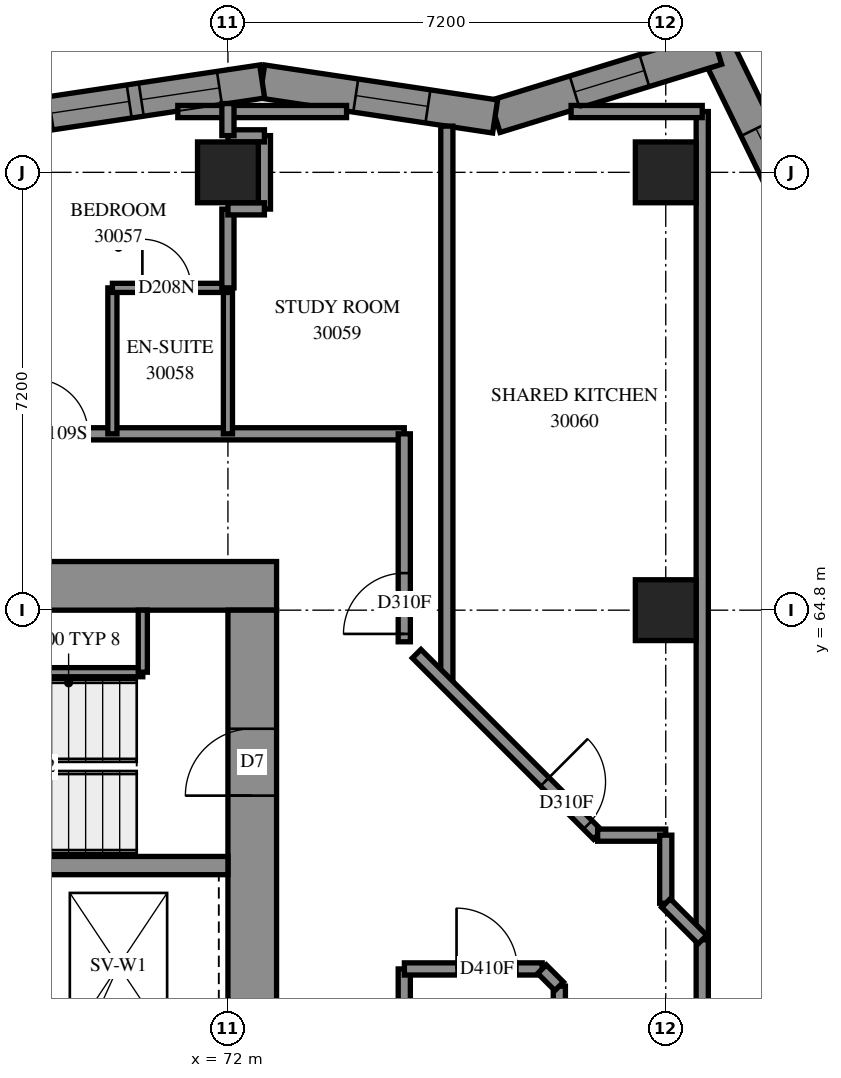
"""IFC4 building model, lengths in metres.
Left out: names, types, materials, properties, quantities, classifications, styles, units other than length and angle.
Written with IfcOpenShell. Run it as: python <this file> out.ifc"""

import sys

from ifc_helpers import new_model, si_unit, direction, frame, frame_2d, origin, origin_2d, place, context, subcontext, project, spatial, polyline, rectangle, outline, extrude, element, fill, save


model = new_model("IFC4")
c1 = context("Model", 3, precision=1e-05, world=origin(), true_north=direction((0.0, 1.0)))
c2 = subcontext(c1, "Body", "Model", "MODEL_VIEW")
j1 = project(units=[si_unit("LENGTHUNIT", "METRE"), si_unit("PLANEANGLEUNIT", "RADIAN")], contexts=[c1])
p1 = place(None, origin())
s1 = spatial("IfcSite", under=j1, at=p1, CompositionType="ELEMENT")
p2 = place(p1, origin())
s2 = spatial("IfcBuilding", under=s1, at=p2, CompositionType="ELEMENT")
p3 = place(p2, frame((0.0, 0.0, 111.8)))
s3 = spatial("IfcBuildingStorey", under=s2, at=p3, CompositionType="ELEMENT", Elevation=111.8)
for number, where, z_axis, x_axis in (
    (1, (72.0, 72.0, 0.0), (0.0, 0.0, 1.0), (1.0, 0.0, 0.0)),
    (2, (79.2, 64.8, 0.0), (0.0, 0.0, 1.0), (1.0, 0.0, 0.0)),
    (3, (79.2, 72.0, 0.0), (0.0, 0.0, 1.0), (1.0, 0.0, 0.0)),
):
    element("IfcColumn", number, at=place(p3, frame(where, z_axis=z_axis, x_axis=x_axis)), inside=s3, PredefinedType="COLUMN", context=c2, shape_type="SweptSolid", body=[
        extrude(rectangle(XDim=1.0, YDim=1.0, at=origin_2d()), origin(), (0.0, 0.0, 1.0), 3.1),
    ])
p4 = place(p3, frame((56.8, 65.2, -0.3), z_axis=(0.0, 0.0, 1.0), x_axis=(1.0, 0.0, 0.0)))
e4 = element("IfcWall", 4, at=p4, inside=s3, PredefinedType="SHEAR", context=c2, shape_type="SweptSolid", body=[
    extrude(rectangle(XDim=16.0, YDim=0.8, at=frame_2d((8.0, 0.0))), origin(), (0.0, 0.0, 1.0), 2.7),
])
p5 = place(p4, frame((10.8, 0.0, 0.3)))
e5 = element("IfcOpeningElement", 5, at=p5, cuts=e4, PredefinedType="OPENING", context=c2, shape_type="SweptSolid", body=[
    extrude(rectangle(XDim=0.8, YDim=2.1, at=frame_2d((0.4, 1.05))), frame((0.0, 0.41, 0.0), z_axis=(0.0, -1.0, 0.0), x_axis=(1.0, 0.0, 0.0)), (0.0, 0.0, 1.0), 0.82),
])
p6 = place(p3, frame((72.4, 50.4, -0.3), z_axis=(0.0, 0.0, 1.0), x_axis=(0.0, 1.0, 0.0)))
e6 = element("IfcWall", 6, at=p6, inside=s3, PredefinedType="SHEAR", context=c2, shape_type="SweptSolid", body=[
    extrude(rectangle(XDim=14.4, YDim=0.8, at=frame_2d((7.2, 0.0))), origin(), (0.0, 0.0, 1.0), 2.7),
])
p7 = place(p6, frame((4.55, 0.0, 0.3)))
e7 = element("IfcOpeningElement", 7, at=p7, cuts=e6, PredefinedType="OPENING", context=c2, shape_type="SweptSolid", body=[
    extrude(rectangle(XDim=1.1, YDim=2.1, at=frame_2d((0.55, 1.05))), frame((0.0, 0.41, 0.0), z_axis=(0.0, -1.0, 0.0), x_axis=(1.0, 0.0, 0.0)), (0.0, 0.0, 1.0), 0.82),
])
p8 = place(p6, frame((11.35, 0.0, 0.3)))
e8 = element("IfcOpeningElement", 8, at=p8, cuts=e6, PredefinedType="OPENING", context=c2, shape_type="SweptSolid", body=[
    extrude(rectangle(XDim=1.1, YDim=2.1, at=frame_2d((0.55, 1.05))), frame((0.0, 0.41, 0.0), z_axis=(0.0, -1.0, 0.0), x_axis=(1.0, 0.0, 0.0)), (0.0, 0.0, 1.0), 0.82),
])
p9 = place(p3, frame((64.8, 60.6, 0.0), z_axis=(0.0, 0.0, 1.0), x_axis=(1.0, 0.0, 0.0)))
e9 = element("IfcWall", 9, at=p9, inside=s3, PredefinedType="SOLIDWALL", context=c2, shape_type="SweptSolid", body=[
    extrude(rectangle(XDim=7.2, YDim=0.3, at=frame_2d((3.6, 0.0))), origin(), (0.0, 0.0, 1.0), 3.1),
])
p10 = place(p3, frame((76.372, 49.373, -0.3), z_axis=(0.0, 0.0, 1.0), x_axis=(0.7071067812, 0.7071067812, 0.0)))
e10 = element("IfcWall", 10, at=p10, inside=s3, PredefinedType="SHEAR", context=c2, shape_type="SweptSolid", body=[
    extrude(rectangle(XDim=14.4, YDim=0.8, at=frame_2d((7.2, 0.0))), origin(), (0.0, 0.0, 1.0), 2.7),
])
p11 = place(p10, frame((4.55, 0.0, 0.3)))
e11 = element("IfcOpeningElement", 11, at=p11, cuts=e10, PredefinedType="OPENING", context=c2, shape_type="SweptSolid", body=[
    extrude(rectangle(XDim=1.1, YDim=2.1, at=frame_2d((0.55, 1.05))), frame((0.0, 0.41, 0.0), z_axis=(0.0, -1.0, 0.0), x_axis=(1.0, 0.0, 0.0)), (0.0, 0.0, 1.0), 0.82),
])
p12 = place(p10, frame((11.35, 0.0, 0.3)))
e12 = element("IfcOpeningElement", 12, at=p12, cuts=e10, PredefinedType="OPENING", context=c2, shape_type="SweptSolid", body=[
    extrude(rectangle(XDim=1.1, YDim=2.1, at=frame_2d((0.55, 1.05))), frame((0.0, 0.41, 0.0), z_axis=(0.0, -1.0, 0.0), x_axis=(1.0, 0.0, 0.0)), (0.0, 0.0, 1.0), 0.82),
])
p13 = place(p3, frame((81.551, 70.947, 0.0), z_axis=(0.0, 0.0, 1.0), x_axis=(-0.4391450206, 0.8984161902, 0.0)))
e13 = element("IfcWall", 13, at=p13, inside=s3, PredefinedType="SOLIDWALL", context=c2, shape_type="SweptSolid", body=[
    extrude(outline(polyline([(0.07, -0.275), (3.678, -0.275), (3.208, 0.275), (-0.07, 0.275), (0.07, -0.275)])), origin(), (0.0, 0.0, 1.0), 3.1),
])
p14 = place(p13, frame((0.773, 0.0, 0.5)))
e14 = element("IfcOpeningElement", 14, at=p14, cuts=e13, PredefinedType="OPENING", context=c2, shape_type="SweptSolid", body=[
    extrude(rectangle(XDim=1.2, YDim=2.45, at=frame_2d((0.6, 1.225))), frame((0.0, 0.285, 0.0), z_axis=(0.0, -1.0, 0.0), x_axis=(1.0, 0.0, 0.0)), (0.0, 0.0, 1.0), 0.57),
])
p15 = place(p3, frame((80.039, 74.04, 0.0), z_axis=(0.0, 0.0, 1.0), x_axis=(-0.9557971513, -0.294026879, 0.0)))
e15 = element("IfcWall", 15, at=p15, inside=s3, PredefinedType="SOLIDWALL", context=c2, shape_type="SweptSolid", body=[
    extrude(outline(polyline([(-0.235, -0.275), (3.751, -0.275), (3.876, 0.275), (0.235, 0.275), (-0.235, -0.275)])), origin(), (0.0, 0.0, 1.0), 3.1),
])
p16 = place(p15, frame((1.245, 0.0, 0.5)))
e16 = element("IfcOpeningElement", 16, at=p16, cuts=e15, PredefinedType="OPENING", context=c2, shape_type="SweptSolid", body=[
    extrude(rectangle(XDim=1.2, YDim=2.45, at=frame_2d((0.6, 1.225))), frame((0.0, 0.285, 0.0), z_axis=(0.0, -1.0, 0.0), x_axis=(1.0, 0.0, 0.0)), (0.0, 0.0, 1.0), 0.57),
])
p17 = place(p3, frame((76.394, 72.919, 0.0), z_axis=(0.0, 0.0, 1.0), x_axis=(-0.9889181677, 0.1484616368, 0.0)))
e17 = element("IfcWall", 17, at=p17, inside=s3, PredefinedType="SOLIDWALL", context=c2, shape_type="SweptSolid", body=[
    extrude(outline(polyline([(0.063, -0.275), (3.915, -0.275), (3.832, 0.275), (-0.063, 0.275), (0.063, -0.275)])), origin(), (0.0, 0.0, 1.0), 3.1),
])
p18 = place(p17, frame((1.118, 0.0, 0.5)))
e18 = element("IfcOpeningElement", 18, at=p18, cuts=e17, PredefinedType="OPENING", context=c2, shape_type="SweptSolid", body=[
    extrude(rectangle(XDim=1.2, YDim=2.45, at=frame_2d((0.6, 1.225))), frame((0.0, 0.285, 0.0), z_axis=(0.0, -1.0, 0.0), x_axis=(1.0, 0.0, 0.0)), (0.0, 0.0, 1.0), 0.57),
])
p19 = place(p3, frame((72.563, 73.494, 0.0), z_axis=(0.0, 0.0, 1.0), x_axis=(-0.9889150173, -0.1484826202, 0.0)))
e19 = element("IfcWall", 19, at=p19, inside=s3, PredefinedType="SOLIDWALL", context=c2, shape_type="SweptSolid", body=[
    extrude(outline(polyline([(-0.041, -0.275), (3.811, -0.275), (3.894, 0.275), (0.041, 0.275), (-0.041, -0.275)])), origin(), (0.0, 0.0, 1.0), 3.1),
])
p20 = place(p19, frame((0.711, 0.0, 0.5)))
e20 = element("IfcOpeningElement", 20, at=p20, cuts=e19, PredefinedType="OPENING", context=c2, shape_type="SweptSolid", body=[
    extrude(rectangle(XDim=1.3, YDim=2.45, at=frame_2d((0.65, 1.225))), frame((0.0, 0.285, 0.0), z_axis=(0.0, -1.0, 0.0), x_axis=(1.0, 0.0, 0.0)), (0.0, 0.0, 1.0), 0.57),
])
p21 = place(p19, frame((2.211, 0.0, 0.5)))
e21 = element("IfcOpeningElement", 21, at=p21, cuts=e19, PredefinedType="OPENING", context=c2, shape_type="SweptSolid", body=[
    extrude(rectangle(XDim=1.3, YDim=2.45, at=frame_2d((0.65, 1.225))), frame((0.0, 0.285, 0.0), z_axis=(0.0, -1.0, 0.0), x_axis=(1.0, 0.0, 0.0)), (0.0, 0.0, 1.0), 0.57),
])
p22 = place(p3, frame((64.95, 63.78, 0.0), z_axis=(0.0, 0.0, 1.0), x_axis=(1.0, 0.0, 0.0)))
e22 = element("IfcWall", 22, at=p22, inside=s3, PredefinedType="PARTITIONING", context=c2, shape_type="SweptSolid", body=[
    extrude(rectangle(XDim=5.65, YDim=0.15, at=frame_2d((2.825, 0.0))), origin(), (0.0, 0.0, 1.0), 3.1),
])
p23 = place(p3, frame((70.6, 63.78, 0.0), z_axis=(0.0, 0.0, 1.0), x_axis=(0.0, 1.0, 0.0)))
e23 = element("IfcWall", 23, at=p23, inside=s3, PredefinedType="PARTITIONING", context=c2, shape_type="SweptSolid", body=[
    extrude(rectangle(XDim=1.02, YDim=0.15, at=frame_2d((0.51, 0.0))), origin(), (0.0, 0.0, 1.0), 3.1),
])
p24 = place(p3, frame((54.7, 67.7, 0.0), z_axis=(0.0, 0.0, 1.0), x_axis=(1.0, 0.0, 0.0)))
e24 = element("IfcWall", 24, at=p24, inside=s3, PredefinedType="PARTITIONING", context=c2, shape_type="SweptSolid", body=[
    extrude(rectangle(XDim=20.2, YDim=0.2, at=frame_2d((10.1, 0.0))), origin(), (0.0, 0.0, 1.0), 3.1),
])
p25 = place(p24, frame((5.2, 0.0, 0.0)))
e25 = element("IfcOpeningElement", 25, at=p25, cuts=e24, PredefinedType="OPENING", context=c2, shape_type="SweptSolid", body=[
    extrude(rectangle(XDim=0.9, YDim=2.1, at=frame_2d((0.45, 1.05))), frame((0.0, 0.11, 0.0), z_axis=(0.0, -1.0, 0.0), x_axis=(1.0, 0.0, 0.0)), (0.0, 0.0, 1.0), 0.22),
])
p26 = place(p24, frame((8.838, 0.0, 0.0)))
e26 = element("IfcOpeningElement", 26, at=p26, cuts=e24, PredefinedType="OPENING", context=c2, shape_type="SweptSolid", body=[
    extrude(rectangle(XDim=1.0, YDim=2.1, at=frame_2d((0.5, 1.05))), frame((0.0, 0.11, 0.0), z_axis=(0.0, -1.0, 0.0), x_axis=(1.0, 0.0, 0.0)), (0.0, 0.0, 1.0), 0.22),
])
p27 = place(p24, frame((14.1, 0.0, 0.0)))
e27 = element("IfcOpeningElement", 27, at=p27, cuts=e24, PredefinedType="OPENING", context=c2, shape_type="SweptSolid", body=[
    extrude(rectangle(XDim=0.9, YDim=2.1, at=frame_2d((0.45, 1.05))), frame((0.0, 0.11, 0.0), z_axis=(0.0, -1.0, 0.0), x_axis=(1.0, 0.0, 0.0)), (0.0, 0.0, 1.0), 0.22),
])
p28 = place(p3, frame((79.8, 59.38, 0.0), z_axis=(0.0, 0.0, 1.0), x_axis=(0.0, 1.0, 0.0)))
e28 = element("IfcWall", 28, at=p28, inside=s3, PredefinedType="PARTITIONING", context=c2, shape_type="SweptSolid", body=[
    extrude(rectangle(XDim=13.62, YDim=0.2, at=frame_2d((6.81, 0.0))), origin(), (0.0, 0.0, 1.0), 3.1),
])
p29 = place(p3, frame((75.6, 63.58, 0.0), z_axis=(0.0, 0.0, 1.0), x_axis=(0.0, 1.0, 0.0)))
e29 = element("IfcWall", 29, at=p29, inside=s3, PredefinedType="PARTITIONING", context=c2, shape_type="SweptSolid", body=[
    extrude(rectangle(XDim=9.18, YDim=0.2, at=frame_2d((4.59, 0.0))), origin(), (0.0, 0.0, 1.0), 3.1),
])
p30 = place(p3, frame((74.9, 53.9, 0.0), z_axis=(0.0, 0.0, 1.0), x_axis=(0.0, 1.0, 0.0)))
e30 = element("IfcWall", 30, at=p30, inside=s3, PredefinedType="PARTITIONING", context=c2, shape_type="SweptSolid", body=[
    extrude(rectangle(XDim=5.0, YDim=0.2, at=frame_2d((2.5, 0.0))), origin(), (0.0, 0.0, 1.0), 3.1),
])
p31 = place(p3, frame((75.103, 64.083, 0.0), z_axis=(0.0, 0.0, 1.0), x_axis=(0.7071067812, -0.7071067812, 0.0)))
e31 = element("IfcWall", 31, at=p31, inside=s3, PredefinedType="PARTITIONING", context=c2, shape_type="SweptSolid", body=[
    extrude(rectangle(XDim=4.214, YDim=0.2, at=frame_2d((2.107, 0.0))), origin(), (0.0, 0.0, 1.0), 3.1),
])
p32 = place(p31, frame((2.979, 0.0, 0.0)))
e32 = element("IfcOpeningElement", 32, at=p32, cuts=e31, PredefinedType="OPENING", context=c2, shape_type="SweptSolid", body=[
    extrude(rectangle(XDim=1.0, YDim=2.1, at=frame_2d((0.5, 1.05))), frame((0.0, 0.11, 0.0), z_axis=(0.0, -1.0, 0.0), x_axis=(1.0, 0.0, 0.0)), (0.0, 0.0, 1.0), 0.22),
])
p33 = place(p3, frame((74.9, 64.28, 0.0), z_axis=(0.0, 0.0, 1.0), x_axis=(0.0, 1.0, 0.0)))
e33 = element("IfcWall", 33, at=p33, inside=s3, PredefinedType="PARTITIONING", context=c2, shape_type="SweptSolid", body=[
    extrude(rectangle(XDim=3.42, YDim=0.2, at=frame_2d((1.71, 0.0))), origin(), (0.0, 0.0, 1.0), 3.1),
])
p34 = place(p33, frame((0.13, 0.0, 0.0)))
e34 = element("IfcOpeningElement", 34, at=p34, cuts=e33, PredefinedType="OPENING", context=c2, shape_type="SweptSolid", body=[
    extrude(rectangle(XDim=1.0, YDim=2.1, at=frame_2d((0.5, 1.05))), frame((0.0, 0.11, 0.0), z_axis=(0.0, -1.0, 0.0), x_axis=(1.0, 0.0, 0.0)), (0.0, 0.0, 1.0), 0.22),
])
p35 = place(p3, frame((71.176, 73.0, 0.0), z_axis=(0.0, 0.0, 1.0), x_axis=(1.0, 0.0, 0.0)))
e35 = element("IfcWall", 35, at=p35, inside=s3, PredefinedType="PARTITIONING", context=c2, shape_type="SweptSolid", body=[
    extrude(rectangle(XDim=2.775, YDim=0.2, at=frame_2d((1.388, 0.0))), origin(), (0.0, 0.0, 1.0), 3.1),
])
p36 = place(p3, frame((77.45, 55.852, 0.0), z_axis=(0.0, 0.0, 1.0), x_axis=(0.0, 1.0, 0.0)))
e36 = element("IfcWall", 36, at=p36, inside=s3, PredefinedType="PARTITIONING", context=c2, shape_type="SweptSolid", body=[
    extrude(rectangle(XDim=2.766, YDim=0.2, at=frame_2d((1.383, 0.0))), origin(), (0.0, 0.0, 1.0), 3.1),
])
p37 = place(p3, frame((79.8, 56.622, 0.0), z_axis=(0.0, 0.0, 1.0), x_axis=(0.0, 1.0, 0.0)))
e37 = element("IfcWall", 37, at=p37, inside=s3, PredefinedType="PARTITIONING", context=c2, shape_type="SweptSolid", body=[
    extrude(rectangle(XDim=2.758, YDim=0.2, at=frame_2d((1.379, 0.0))), origin(), (0.0, 0.0, 1.0), 3.1),
])
for number, where, z_axis, x_axis in (
    (38, (70.1, 67.7, 0.0), (0.0, 0.0, 1.0), (0.0, 1.0, 0.0)),
    (39, (72.0, 67.7, 0.0), (0.0, 0.0, 1.0), (0.0, 1.0, 0.0)),
):
    element("IfcWall", number, at=place(p3, frame(where, z_axis=z_axis, x_axis=x_axis)), inside=s3, PredefinedType="PARTITIONING", context=c2, shape_type="SweptSolid", body=[
        extrude(rectangle(XDim=2.4, YDim=0.15, at=frame_2d((1.2, 0.0))), origin(), (0.0, 0.0, 1.0), 3.1),
    ])
p38 = place(p3, frame((74.902, 58.9, 0.0), z_axis=(0.0, 0.0, 1.0), x_axis=(1.0, 0.0, 0.0)))
e40 = element("IfcWall", 40, at=p38, inside=s3, PredefinedType="PARTITIONING", context=c2, shape_type="SweptSolid", body=[
    extrude(rectangle(XDim=2.266, YDim=0.2, at=frame_2d((1.133, 0.0))), origin(), (0.0, 0.0, 1.0), 3.1),
])
p39 = place(p38, frame((0.858, 0.0, 0.0)))
e41 = element("IfcOpeningElement", 41, at=p39, cuts=e40, PredefinedType="OPENING", context=c2, shape_type="SweptSolid", body=[
    extrude(rectangle(XDim=1.0, YDim=2.1, at=frame_2d((0.5, 1.05))), frame((0.0, 0.11, 0.0), z_axis=(0.0, -1.0, 0.0), x_axis=(1.0, 0.0, 0.0)), (0.0, 0.0, 1.0), 0.22),
])
p40 = place(p3, frame((77.643, 73.0, 0.0), z_axis=(0.0, 0.0, 1.0), x_axis=(1.0, 0.0, 0.0)))
e42 = element("IfcWall", 42, at=p40, inside=s3, PredefinedType="PARTITIONING", context=c2, shape_type="SweptSolid", body=[
    extrude(rectangle(XDim=2.157, YDim=0.2, at=frame_2d((1.078, 0.0))), origin(), (0.0, 0.0, 1.0), 3.1),
])
p41 = place(p3, frame((70.1, 70.1, 0.0), z_axis=(0.0, 0.0, 1.0), x_axis=(1.0, 0.0, 0.0)))
e43 = element("IfcWall", 43, at=p41, inside=s3, PredefinedType="PARTITIONING", context=c2, shape_type="SweptSolid", body=[
    extrude(rectangle(XDim=1.9, YDim=0.15, at=frame_2d((0.95, 0.0))), origin(), (0.0, 0.0, 1.0), 3.1),
])
p42 = place(p41, frame((0.493, 0.0, 0.0)))
e44 = element("IfcOpeningElement", 44, at=p42, cuts=e43, PredefinedType="OPENING", context=c2, shape_type="SweptSolid", body=[
    extrude(rectangle(XDim=0.8, YDim=2.1, at=frame_2d((0.4, 1.05))), frame((0.0, 0.085, 0.0), z_axis=(0.0, -1.0, 0.0), x_axis=(1.0, 0.0, 0.0)), (0.0, 0.0, 1.0), 0.17),
])
p43 = place(p3, frame((72.0, 70.1, 0.0), z_axis=(0.0, 0.0, 1.0), x_axis=(0.0, 1.0, 0.0)))
e45 = element("IfcWall", 45, at=p43, inside=s3, PredefinedType="PARTITIONING", context=c2, shape_type="SweptSolid", body=[
    extrude(rectangle(XDim=1.296, YDim=0.2, at=frame_2d((0.648, 0.0))), origin(), (0.0, 0.0, 1.0), 3.1),
])
p44 = place(p3, frame((72.6, 71.396, 0.0), z_axis=(0.0, 0.0, 1.0), x_axis=(0.0, 1.0, 0.0)))
e46 = element("IfcWall", 46, at=p44, inside=s3, PredefinedType="PARTITIONING", context=c2, shape_type="SweptSolid", body=[
    extrude(rectangle(XDim=1.208, YDim=0.2, at=frame_2d((0.604, 0.0))), origin(), (0.0, 0.0, 1.0), 3.1),
])
for number, where, z_axis, x_axis in (
    (47, (78.08, 61.1, 0.0), (0.0, 0.0, 1.0), (1.0, 0.0, 0.0)),
    (48, (79.2, 59.98, 0.0), (0.0, 0.0, 1.0), (0.0, 1.0, 0.0)),
):
    element("IfcWall", number, at=place(p3, frame(where, z_axis=z_axis, x_axis=x_axis)), inside=s3, PredefinedType="PARTITIONING", context=c2, shape_type="SweptSolid", body=[
        extrude(rectangle(XDim=1.12, YDim=0.2, at=frame_2d((0.56, 0.0))), origin(), (0.0, 0.0, 1.0), 3.1),
    ])
p45 = place(p3, frame((79.203, 59.983, 0.0), z_axis=(0.0, 0.0, 1.0), x_axis=(0.7071067812, -0.7071067812, 0.0)))
e49 = element("IfcWall", 49, at=p45, inside=s3, PredefinedType="PARTITIONING", context=c2, shape_type="SweptSolid", body=[
    extrude(rectangle(XDim=0.849, YDim=0.2, at=frame_2d((0.424, 0.0))), origin(), (0.0, 0.0, 1.0), 3.1),
])
for number, where, z_axis, x_axis in (
    (50, (72.0, 72.6, 0.0), (0.0, 0.0, 1.0), (1.0, 0.0, 0.0)),
    (51, (72.0, 71.4, 0.0), (0.0, 0.0, 1.0), (1.0, 0.0, 0.0)),
):
    element("IfcWall", number, at=place(p3, frame(where, z_axis=z_axis, x_axis=x_axis)), inside=s3, PredefinedType="PARTITIONING", context=c2, shape_type="SweptSolid", body=[
        extrude(rectangle(XDim=0.6, YDim=0.2, at=frame_2d((0.3, 0.0))), origin(), (0.0, 0.0, 1.0), 3.1),
    ])
p46 = place(p3, frame((72.0, 72.604, 0.0), z_axis=(0.0, 0.0, 1.0), x_axis=(0.0, 1.0, 0.0)))
e52 = element("IfcWall", 52, at=p46, inside=s3, PredefinedType="PARTITIONING", context=c2, shape_type="SweptSolid", body=[
    extrude(rectangle(XDim=0.527, YDim=0.2, at=frame_2d((0.264, 0.0))), origin(), (0.0, 0.0, 1.0), 3.1),
])
p47 = place(p3, frame((77.165, 58.897, 0.0), z_axis=(0.0, 0.0, 1.0), x_axis=(0.7071067812, -0.7071067812, 0.0)))
e53 = element("IfcWall", 53, at=p47, inside=s3, PredefinedType="PARTITIONING", context=c2, shape_type="SweptSolid", body=[
    extrude(rectangle(XDim=0.399, YDim=0.2, at=frame_2d((0.199, 0.0))), origin(), (0.0, 0.0, 1.0), 3.1),
])
p48 = place(p14, origin())
e54 = element("IfcWindow", 54, at=p48, inside=s3, PartitioningType="SINGLE_PANEL", PredefinedType="WINDOW", context=c2, shape_type="SweptSolid", body=[
    extrude(rectangle(XDim=1.2, YDim=2.45, at=frame_2d((0.6, 1.225))), frame((0.0, 0.155, 0.0), z_axis=(0.0, -1.0, 0.0), x_axis=(1.0, 0.0, 0.0)), (0.0, 0.0, 1.0), 0.06),
])
fill(e14, e54)
p49 = place(p16, origin())
e55 = element("IfcWindow", 55, at=p49, inside=s3, PartitioningType="SINGLE_PANEL", PredefinedType="WINDOW", context=c2, shape_type="SweptSolid", body=[
    extrude(rectangle(XDim=1.2, YDim=2.45, at=frame_2d((0.6, 1.225))), frame((0.0, 0.155, 0.0), z_axis=(0.0, -1.0, 0.0), x_axis=(1.0, 0.0, 0.0)), (0.0, 0.0, 1.0), 0.06),
])
fill(e16, e55)
p50 = place(p18, origin())
e56 = element("IfcWindow", 56, at=p50, inside=s3, PartitioningType="SINGLE_PANEL", PredefinedType="WINDOW", context=c2, shape_type="SweptSolid", body=[
    extrude(rectangle(XDim=1.2, YDim=2.45, at=frame_2d((0.6, 1.225))), frame((0.0, 0.155, 0.0), z_axis=(0.0, -1.0, 0.0), x_axis=(1.0, 0.0, 0.0)), (0.0, 0.0, 1.0), 0.06),
])
fill(e18, e56)
p51 = place(p20, origin())
e57 = element("IfcWindow", 57, at=p51, inside=s3, PartitioningType="SINGLE_PANEL", PredefinedType="WINDOW", context=c2, shape_type="SweptSolid", body=[
    extrude(rectangle(XDim=1.3, YDim=2.45, at=frame_2d((0.65, 1.225))), frame((0.0, 0.145, 0.0), z_axis=(0.0, -1.0, 0.0), x_axis=(1.0, 0.0, 0.0)), (0.0, 0.0, 1.0), 0.06),
])
fill(e20, e57)
p52 = place(p21, origin())
e58 = element("IfcWindow", 58, at=p52, inside=s3, PartitioningType="SINGLE_PANEL", PredefinedType="WINDOW", context=c2, shape_type="SweptSolid", body=[
    extrude(rectangle(XDim=1.3, YDim=2.45, at=frame_2d((0.65, 1.225))), frame((0.0, 0.155, 0.0), z_axis=(0.0, -1.0, 0.0), x_axis=(1.0, 0.0, 0.0)), (0.0, 0.0, 1.0), 0.06),
])
fill(e21, e58)
p53 = place(p8, origin())
e59 = element("IfcDoor", 59, at=p53, inside=s3, OperationType="SINGLE_SWING_RIGHT", PredefinedType="DOOR", context=c2, shape_type="SweptSolid", body=[
    extrude(rectangle(XDim=1.1, YDim=2.1, at=frame_2d((0.55, 1.05))), frame((0.0, 0.025, 0.0), z_axis=(0.0, -1.0, 0.0), x_axis=(1.0, 0.0, 0.0)), (0.0, 0.0, 1.0), 0.05),
])
fill(e8, e59)
p54 = place(p39, origin())
e60 = element("IfcDoor", 60, at=p54, inside=s3, OperationType="SINGLE_SWING_RIGHT", PredefinedType="DOOR", context=c2, shape_type="SweptSolid", body=[
    extrude(rectangle(XDim=1.0, YDim=2.1, at=frame_2d((0.5, 1.05))), frame((0.0, 0.025, 0.0), z_axis=(0.0, -1.0, 0.0), x_axis=(1.0, 0.0, 0.0)), (0.0, 0.0, 1.0), 0.05),
])
fill(e41, e60)
p55 = place(p27, origin())
e61 = element("IfcDoor", 61, at=p55, inside=s3, OperationType="SINGLE_SWING_LEFT", PredefinedType="DOOR", context=c2, shape_type="SweptSolid", body=[
    extrude(rectangle(XDim=0.9, YDim=2.1, at=frame_2d((0.45, 1.05))), frame((0.0, 0.025, 0.0), z_axis=(0.0, -1.0, 0.0), x_axis=(1.0, 0.0, 0.0)), (0.0, 0.0, 1.0), 0.05),
])
fill(e27, e61)
p56 = place(p42, origin())
e62 = element("IfcDoor", 62, at=p56, inside=s3, OperationType="SINGLE_SWING_RIGHT", PredefinedType="DOOR", context=c2, shape_type="SweptSolid", body=[
    extrude(rectangle(XDim=0.8, YDim=2.1, at=frame_2d((0.4, 1.05))), frame((0.0, 0.025, 0.0), z_axis=(0.0, -1.0, 0.0), x_axis=(1.0, 0.0, 0.0)), (0.0, 0.0, 1.0), 0.05),
])
fill(e44, e62)
p57 = place(p34, origin())
e63 = element("IfcDoor", 63, at=p57, inside=s3, OperationType="SINGLE_SWING_RIGHT", PredefinedType="DOOR", context=c2, shape_type="SweptSolid", body=[
    extrude(rectangle(XDim=1.0, YDim=2.1, at=frame_2d((0.5, 1.05))), frame((0.0, 0.025, 0.0), z_axis=(0.0, -1.0, 0.0), x_axis=(1.0, 0.0, 0.0)), (0.0, 0.0, 1.0), 0.05),
])
fill(e34, e63)
p58 = place(p32, origin())
e64 = element("IfcDoor", 64, at=p58, inside=s3, OperationType="SINGLE_SWING_LEFT", PredefinedType="DOOR", context=c2, shape_type="SweptSolid", body=[
    extrude(rectangle(XDim=1.0, YDim=2.1, at=frame_2d((0.5, 1.05))), frame((0.0, 0.025, 0.0), z_axis=(0.0, -1.0, 0.0), x_axis=(1.0, 0.0, 0.0)), (0.0, 0.0, 1.0), 0.05),
])
fill(e32, e64)
save(model, sys.argv[1])
